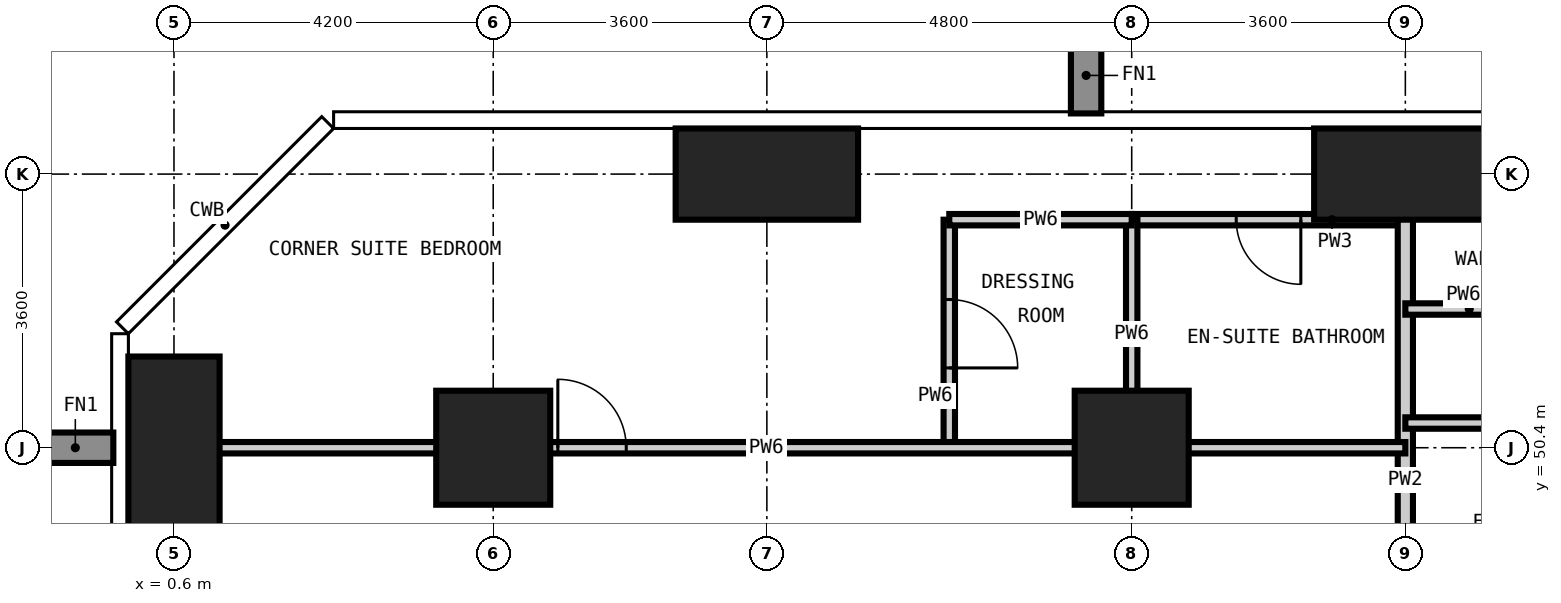
"""IFC4 building model, lengths in metres.
Left out: names, types, materials, properties, quantities, classifications, styles, units other than length and angle.
Written with IfcOpenShell. Run it as: python <this file> out.ifc"""

import sys

from ifc_helpers import new_model, si_unit, direction, frame, frame_2d, origin, origin_2d, place, context, subcontext, project, spatial, rectangle, extrude, element, fill, save


model = new_model("IFC4")
c1 = context("Model", 3, precision=1e-05, world=origin(), true_north=direction((0.0, 1.0)))
c2 = subcontext(c1, "Body", "Model", "MODEL_VIEW")
j1 = project(units=[si_unit("LENGTHUNIT", "METRE"), si_unit("PLANEANGLEUNIT", "RADIAN")], contexts=[c1])
p1 = place(None, origin())
s1 = spatial("IfcSite", under=j1, at=p1, CompositionType="ELEMENT")
p2 = place(p1, origin())
s2 = spatial("IfcBuilding", under=s1, at=p2, CompositionType="ELEMENT")
p3 = place(p2, frame((0.0, 0.0, 100.8)))
s3 = spatial("IfcBuildingStorey", under=s2, at=p3, CompositionType="ELEMENT", Elevation=100.8)
p4 = place(p3, frame((0.6, 50.4, -0.35), z_axis=(0.0, 0.0, 1.0), x_axis=(1.0, 0.0, 0.0)))
e1 = element("IfcColumn", 1, at=p4, inside=s3, PredefinedType="COLUMN", context=c2, shape_type="SweptSolid", body=[
    extrude(rectangle(XDim=1.2, YDim=2.4, at=origin_2d()), origin(), (0.0, 0.0, 1.0), 3.6),
])
p5 = place(p3, frame((4.8, 50.4, -0.35), z_axis=(0.0, 0.0, 1.0), x_axis=(1.0, 0.0, 0.0)))
e2 = element("IfcColumn", 2, at=p5, inside=s3, PredefinedType="COLUMN", context=c2, shape_type="SweptSolid", body=[
    extrude(rectangle(XDim=1.5, YDim=1.5, at=origin_2d()), origin(), (0.0, 0.0, 1.0), 3.6),
])
p6 = place(p3, frame((8.4, 54.0, -0.35), z_axis=(0.0, 0.0, 1.0), x_axis=(1.0, 0.0, 0.0)))
e3 = element("IfcColumn", 3, at=p6, inside=s3, PredefinedType="COLUMN", context=c2, shape_type="SweptSolid", body=[
    extrude(rectangle(XDim=2.4, YDim=1.2, at=origin_2d()), origin(), (0.0, 0.0, 1.0), 3.6),
])
p7 = place(p3, frame((13.2, 50.4, -0.35), z_axis=(0.0, 0.0, 1.0), x_axis=(1.0, 0.0, 0.0)))
e4 = element("IfcColumn", 4, at=p7, inside=s3, PredefinedType="COLUMN", context=c2, shape_type="SweptSolid", body=[
    extrude(rectangle(XDim=1.5, YDim=1.5, at=origin_2d()), origin(), (0.0, 0.0, 1.0), 3.6),
])
p8 = place(p3, frame((16.8, 54.0, -0.35), z_axis=(0.0, 0.0, 1.0), x_axis=(1.0, 0.0, 0.0)))
e5 = element("IfcColumn", 5, at=p8, inside=s3, PredefinedType="COLUMN", context=c2, shape_type="SweptSolid", body=[
    extrude(rectangle(XDim=2.4, YDim=1.2, at=origin_2d()), origin(), (0.0, 0.0, 1.0), 3.6),
])
p9 = place(p3, frame((13.2, 53.4, 0.0), z_axis=(0.0, 0.0, 1.0), x_axis=(1.0, 0.0, 0.0)))
e6 = element("IfcWall", 6, at=p9, inside=s3, PredefinedType="PARTITIONING", context=c2, shape_type="SweptSolid", body=[
    extrude(rectangle(XDim=3.6, YDim=0.15, at=frame_2d((1.8, 0.0))), origin(), (0.0, 0.0, 1.0), 3.25),
])
p10 = place(p9, frame((1.375, 0.0, 0.0)))
e7 = element("IfcOpeningElement", 7, at=p10, cuts=e6, PredefinedType="OPENING", context=c2, shape_type="SweptSolid", body=[
    extrude(rectangle(XDim=0.85, YDim=2.1, at=frame_2d((0.425, 1.05))), frame((0.0, 0.085, 0.0), z_axis=(0.0, -1.0, 0.0), x_axis=(1.0, 0.0, 0.0)), (0.0, 0.0, 1.0), 0.17),
])
p11 = place(p3, frame((16.8, 45.325, 0.0), z_axis=(0.0, 0.0, 1.0), x_axis=(0.0, 1.0, 0.0)))
e8 = element("IfcWall", 8, at=p11, inside=s3, PredefinedType="PARTITIONING", context=c2, shape_type="SweptSolid", body=[
    extrude(rectangle(XDim=9.293, YDim=0.2, at=frame_2d((4.646, 0.0))), origin(), (0.0, 0.0, 1.0), 3.25),
])
p12 = place(p3, frame((10.8, 50.4, 0.0), z_axis=(0.0, 0.0, 1.0), x_axis=(0.0, 1.0, 0.0)))
e9 = element("IfcWall", 9, at=p12, inside=s3, PredefinedType="PARTITIONING", context=c2, shape_type="SweptSolid", body=[
    extrude(rectangle(XDim=3.0, YDim=0.15, at=frame_2d((1.5, 0.0))), origin(), (0.0, 0.0, 1.0), 3.25),
])
p13 = place(p12, frame((1.05, 0.0, 0.0)))
e10 = element("IfcOpeningElement", 10, at=p13, cuts=e9, PredefinedType="OPENING", context=c2, shape_type="SweptSolid", body=[
    extrude(rectangle(XDim=0.9, YDim=2.1, at=frame_2d((0.45, 1.05))), frame((0.0, 0.085, 0.0), z_axis=(0.0, -1.0, 0.0), x_axis=(1.0, 0.0, 0.0)), (0.0, 0.0, 1.0), 0.17),
])
p14 = place(p3, frame((13.2, 50.4, 0.0), z_axis=(0.0, 0.0, 1.0), x_axis=(0.0, 1.0, 0.0)))
e11 = element("IfcWall", 11, at=p14, inside=s3, PredefinedType="PARTITIONING", context=c2, shape_type="SweptSolid", body=[
    extrude(rectangle(XDim=3.0, YDim=0.15, at=frame_2d((1.5, 0.0))), origin(), (0.0, 0.0, 1.0), 3.25),
])
p15 = place(p3, frame((-0.018, 50.4, 0.0), z_axis=(0.0, 0.0, 1.0), x_axis=(1.0, 0.0, 0.0)))
e12 = element("IfcWall", 12, at=p15, inside=s3, PredefinedType="PARTITIONING", context=c2, shape_type="SweptSolid", body=[
    extrude(rectangle(XDim=16.818, YDim=0.15, at=frame_2d((8.409, 0.0))), origin(), (0.0, 0.0, 1.0), 3.25),
])
p16 = place(p15, frame((5.668, 0.0, 0.0)))
e13 = element("IfcOpeningElement", 13, at=p16, cuts=e12, PredefinedType="OPENING", context=c2, shape_type="SweptSolid", body=[
    extrude(rectangle(XDim=0.9, YDim=2.1, at=frame_2d((0.45, 1.05))), frame((0.0, 0.085, 0.0), z_axis=(0.0, -1.0, 0.0), x_axis=(1.0, 0.0, 0.0)), (0.0, 0.0, 1.0), 0.17),
])
p17 = place(p3, frame((16.8, 50.725, 0.0), z_axis=(0.0, 0.0, 1.0), x_axis=(1.0, 0.0, 0.0)))
e14 = element("IfcWall", 14, at=p17, inside=s3, PredefinedType="PARTITIONING", context=c2, shape_type="SweptSolid", body=[
    extrude(rectangle(XDim=3.0, YDim=0.15, at=frame_2d((1.5, 0.0))), origin(), (0.0, 0.0, 1.0), 3.25),
])
p18 = place(p3, frame((16.8, 52.225, 0.0), z_axis=(0.0, 0.0, 1.0), x_axis=(1.0, 0.0, 0.0)))
e15 = element("IfcWall", 15, at=p18, inside=s3, PredefinedType="PARTITIONING", context=c2, shape_type="SweptSolid", body=[
    extrude(rectangle(XDim=3.0, YDim=0.15, at=frame_2d((1.5, 0.0))), origin(), (0.0, 0.0, 1.0), 3.25),
])
p19 = place(p18, frame((1.25, 0.0, 0.0)))
e16 = element("IfcOpeningElement", 16, at=p19, cuts=e15, PredefinedType="OPENING", context=c2, shape_type="SweptSolid", body=[
    extrude(rectangle(XDim=0.9, YDim=2.1, at=frame_2d((0.45, 1.05))), frame((0.0, 0.085, 0.0), z_axis=(0.0, -1.0, 0.0), x_axis=(1.0, 0.0, 0.0)), (0.0, 0.0, 1.0), 0.17),
])
p20 = place(p3, frame((10.8, 53.4, 0.0), z_axis=(0.0, 0.0, 1.0), x_axis=(1.0, 0.0, 0.0)))
e17 = element("IfcWall", 17, at=p20, inside=s3, PredefinedType="PARTITIONING", context=c2, shape_type="SweptSolid", body=[
    extrude(rectangle(XDim=2.4, YDim=0.15, at=frame_2d((1.2, 0.0))), origin(), (0.0, 0.0, 1.0), 3.25),
])
p21 = place(p16, origin())
e18 = element("IfcDoor", 18, at=p21, inside=s3, OperationType="SINGLE_SWING_LEFT", PredefinedType="DOOR", context=c2, shape_type="SweptSolid", body=[
    extrude(rectangle(XDim=0.9, YDim=2.1, at=frame_2d((0.45, 1.05))), frame((0.0, 0.025, 0.0), z_axis=(0.0, -1.0, 0.0), x_axis=(1.0, 0.0, 0.0)), (0.0, 0.0, 1.0), 0.05),
])
fill(e13, e18)
p22 = place(p10, frame((0.85, 0.0, 0.0), z_axis=(0.0, 0.0, 1.0), x_axis=(-1.0, 0.0, 0.0)))
e19 = element("IfcDoor", 19, at=p22, inside=s3, OperationType="SINGLE_SWING_LEFT", PredefinedType="DOOR", context=c2, shape_type="SweptSolid", body=[
    extrude(rectangle(XDim=0.85, YDim=2.1, at=frame_2d((0.425, 1.05))), frame((0.0, 0.025, 0.0), z_axis=(0.0, -1.0, 0.0), x_axis=(1.0, 0.0, 0.0)), (0.0, 0.0, 1.0), 0.05),
])
fill(e7, e19)
p23 = place(p13, frame((0.9, 0.0, 0.0), z_axis=(0.0, 0.0, 1.0), x_axis=(-1.0, 0.0, 0.0)))
e20 = element("IfcDoor", 20, at=p23, inside=s3, OperationType="SINGLE_SWING_RIGHT", PredefinedType="DOOR", context=c2, shape_type="SweptSolid", body=[
    extrude(rectangle(XDim=0.9, YDim=2.1, at=frame_2d((0.45, 1.05))), frame((0.0, 0.025, 0.0), z_axis=(0.0, -1.0, 0.0), x_axis=(1.0, 0.0, 0.0)), (0.0, 0.0, 1.0), 0.05),
])
fill(e10, e20)
save(model, sys.argv[1])
